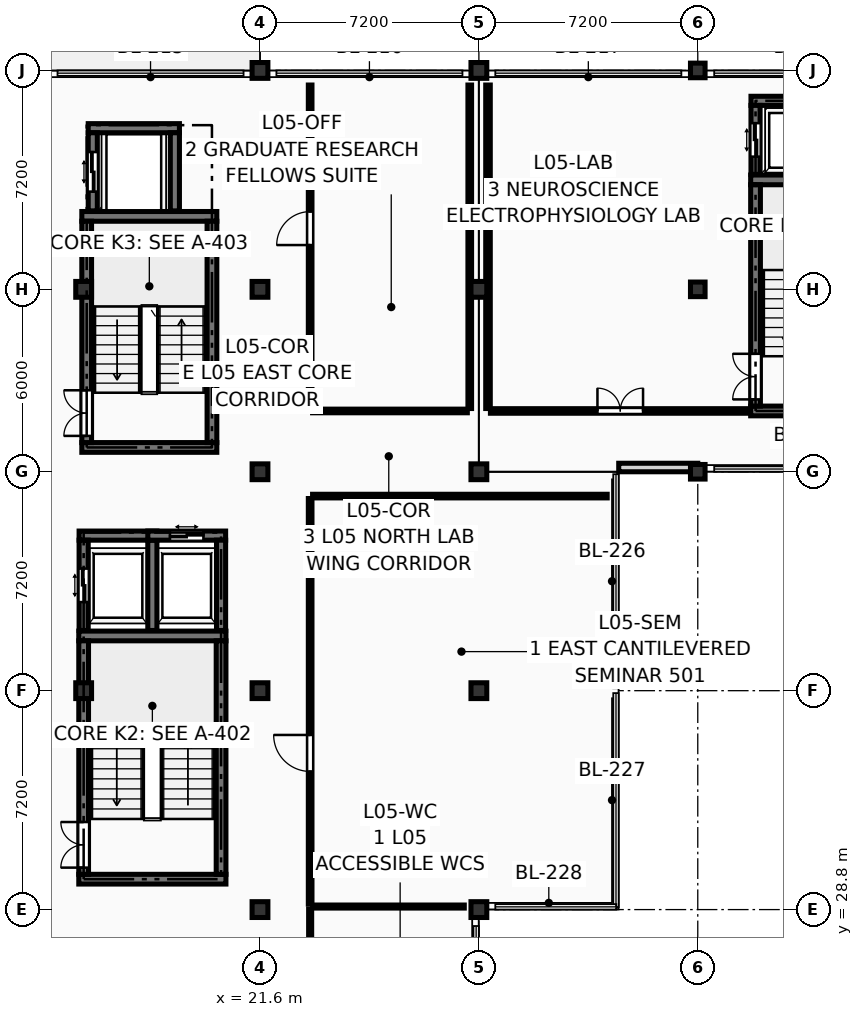
"""IFC4 building model, lengths in metres.
Left out: names, types, materials, properties, quantities, classifications, styles, units other than length and angle.
Written with IfcOpenShell. Run it as: python <this file> out.ifc"""

import sys

from ifc_helpers import new_model, si_unit, direction, frame, frame_2d, origin, origin_2d, place, context, subcontext, project, spatial, rectangle, extrude, element, fill, save


model = new_model("IFC4")
c1 = context("Model", 3, precision=1e-05, world=origin(), true_north=direction((0.0, 1.0)))
c2 = subcontext(c1, "Body", "Model", "MODEL_VIEW")
j1 = project(units=[si_unit("LENGTHUNIT", "METRE"), si_unit("PLANEANGLEUNIT", "RADIAN")], contexts=[c1])
p1 = place(None, origin())
s1 = spatial("IfcSite", under=j1, at=p1, CompositionType="ELEMENT")
p2 = place(p1, origin())
s2 = spatial("IfcBuilding", under=s1, at=p2, CompositionType="ELEMENT")
p3 = place(p2, frame((0.0, 0.0, 19.35)))
s3 = spatial("IfcBuildingStorey", under=s2, at=p3, CompositionType="ELEMENT", Elevation=19.35)
for number, where, z_axis, x_axis in (
    (1, (15.8, 36.0, 0.0), (0.0, 0.0, 1.0), (1.0, 0.0, 0.0)),
    (2, (15.8, 49.2, 0.0), (0.0, 0.0, 1.0), (1.0, 0.0, 0.0)),
    (3, (21.6, 28.8, 0.0), (0.0, 0.0, 1.0), (1.0, 0.0, 0.0)),
    (4, (21.6, 36.0, 0.0), (0.0, 0.0, 1.0), (1.0, 0.0, 0.0)),
    (5, (21.6, 43.2, 0.0), (0.0, 0.0, 1.0), (1.0, 0.0, 0.0)),
    (6, (21.6, 49.2, 0.0), (0.0, 0.0, 1.0), (1.0, 0.0, 0.0)),
    (7, (21.6, 56.4, 0.0), (0.0, 0.0, 1.0), (1.0, 0.0, 0.0)),
    (8, (28.8, 28.8, 0.0), (0.0, 0.0, 1.0), (1.0, 0.0, 0.0)),
    (9, (28.8, 36.0, 0.0), (0.0, 0.0, 1.0), (1.0, 0.0, 0.0)),
    (10, (28.8, 43.2, 0.0), (0.0, 0.0, 1.0), (1.0, 0.0, 0.0)),
    (11, (28.8, 49.2, 0.0), (0.0, 0.0, 1.0), (1.0, 0.0, 0.0)),
    (12, (28.8, 56.4, 0.0), (0.0, 0.0, 1.0), (1.0, 0.0, 0.0)),
):
    element("IfcColumn", number, at=place(p3, frame(where, z_axis=z_axis, x_axis=x_axis)), inside=s3, PredefinedType="COLUMN", context=c2, shape_type="SweptSolid", body=[
        extrude(rectangle(XDim=0.52, YDim=0.52, at=origin_2d()), origin(), (0.0, 0.0, 1.0), 3.6),
    ])
for number, where, z_axis, x_axis in (
    (13, (36.0, 43.2, 0.0), (0.0, 0.0, 1.0), (1.0, 0.0, 0.0)),
    (14, (36.0, 49.2, 0.0), (0.0, 0.0, 1.0), (1.0, 0.0, 0.0)),
    (15, (36.0, 56.4, 0.0), (0.0, 0.0, 1.0), (1.0, 0.0, 0.0)),
):
    element("IfcColumn", number, at=place(p3, frame(where, z_axis=z_axis, x_axis=x_axis)), inside=s3, PredefinedType="COLUMN", context=c2, shape_type="SweptSolid", body=[
        extrude(rectangle(XDim=0.48, YDim=0.48, at=origin_2d()), origin(), (0.0, 0.0, 1.0), 3.6),
    ])
p4 = place(p3, frame((33.4, 43.34, 0.0), z_axis=(0.0, 0.0, 1.0), x_axis=(1.0, 0.0, 0.0)))
e16 = element("IfcWall", 16, at=p4, inside=s3, PredefinedType="SOLIDWALL", context=c2, shape_type="SweptSolid", body=[
    extrude(rectangle(XDim=2.6, YDim=0.28, at=frame_2d((1.3, 0.0))), origin(), (0.0, 0.0, 1.0), 3.38),
])
for number, where, z_axis, x_axis in (
    (17, (15.64, 29.8, 0.0), (0.0, 0.0, 1.0), (1.0, 0.0, 0.0)),
    (18, (15.64, 37.8, 0.0), (0.0, 0.0, 1.0), (1.0, 0.0, 0.0)),
):
    element("IfcWall", number, at=place(p3, frame(where, z_axis=z_axis, x_axis=x_axis)), inside=s3, PredefinedType="SHEAR", context=c2, shape_type="SweptSolid", body=[
        extrude(rectangle(XDim=4.84, YDim=0.32, at=frame_2d((2.42, 0.0))), origin(), (0.0, 0.0, 1.0), 3.39),
    ])
p5 = place(p3, frame((15.8, 29.96, 0.0), z_axis=(0.0, 0.0, 1.0), x_axis=(0.0, 1.0, 0.0)))
e19 = element("IfcWall", 19, at=p5, inside=s3, PredefinedType="SHEAR", context=c2, shape_type="SweptSolid", body=[
    extrude(rectangle(XDim=7.68, YDim=0.32, at=frame_2d((3.84, 0.0))), origin(), (0.0, 0.0, 1.0), 3.39),
])
p6 = place(p5, frame((0.22, 0.0, 0.0)))
e20 = element("IfcOpeningElement", 20, at=p6, cuts=e19, PredefinedType="OPENING", context=c2, shape_type="SweptSolid", body=[
    extrude(rectangle(XDim=1.5, YDim=2.2, at=frame_2d((0.75, 1.1))), frame((0.0, 0.172, 0.0), z_axis=(0.0, -1.0, 0.0), x_axis=(1.0, 0.0, 0.0)), (0.0, 0.0, 1.0), 0.344),
])
p7 = place(p3, frame((20.32, 29.96, 0.0), z_axis=(0.0, 0.0, 1.0), x_axis=(0.0, 1.0, 0.0)))
e21 = element("IfcWall", 21, at=p7, inside=s3, PredefinedType="SHEAR", context=c2, shape_type="SweptSolid", body=[
    extrude(rectangle(XDim=7.68, YDim=0.32, at=frame_2d((3.84, 0.0))), origin(), (0.0, 0.0, 1.0), 3.39),
])
for number, where, z_axis, x_axis in (
    (22, (15.74, 44.0, 0.0), (0.0, 0.0, 1.0), (1.0, 0.0, 0.0)),
    (23, (15.74, 51.6, 0.0), (0.0, 0.0, 1.0), (1.0, 0.0, 0.0)),
):
    element("IfcWall", number, at=place(p3, frame(where, z_axis=z_axis, x_axis=x_axis)), inside=s3, PredefinedType="SHEAR", context=c2, shape_type="SweptSolid", body=[
        extrude(rectangle(XDim=4.44, YDim=0.32, at=frame_2d((2.22, 0.0))), origin(), (0.0, 0.0, 1.0), 3.39),
    ])
p8 = place(p3, frame((15.9, 44.16, 0.0), z_axis=(0.0, 0.0, 1.0), x_axis=(0.0, 1.0, 0.0)))
e24 = element("IfcWall", 24, at=p8, inside=s3, PredefinedType="SHEAR", context=c2, shape_type="SweptSolid", body=[
    extrude(rectangle(XDim=7.28, YDim=0.32, at=frame_2d((3.64, 0.0))), origin(), (0.0, 0.0, 1.0), 3.39),
])
p9 = place(p8, frame((0.22, 0.0, 0.0)))
e25 = element("IfcOpeningElement", 25, at=p9, cuts=e24, PredefinedType="OPENING", context=c2, shape_type="SweptSolid", body=[
    extrude(rectangle(XDim=1.5, YDim=2.2, at=frame_2d((0.75, 1.1))), frame((0.0, 0.172, 0.0), z_axis=(0.0, -1.0, 0.0), x_axis=(1.0, 0.0, 0.0)), (0.0, 0.0, 1.0), 0.344),
])
p10 = place(p3, frame((20.02, 44.16, 0.0), z_axis=(0.0, 0.0, 1.0), x_axis=(0.0, 1.0, 0.0)))
e26 = element("IfcWall", 26, at=p10, inside=s3, PredefinedType="SHEAR", context=c2, shape_type="SweptSolid", body=[
    extrude(rectangle(XDim=7.28, YDim=0.32, at=frame_2d((3.64, 0.0))), origin(), (0.0, 0.0, 1.0), 3.39),
])
for number, where, z_axis, x_axis in (
    (27, (37.74, 45.2, 0.0), (0.0, 0.0, 1.0), (1.0, 0.0, 0.0)),
    (28, (37.74, 52.8, 0.0), (0.0, 0.0, 1.0), (1.0, 0.0, 0.0)),
):
    element("IfcWall", number, at=place(p3, frame(where, z_axis=z_axis, x_axis=x_axis)), inside=s3, PredefinedType="SHEAR", context=c2, shape_type="SweptSolid", body=[
        extrude(rectangle(XDim=4.44, YDim=0.32, at=frame_2d((2.22, 0.0))), origin(), (0.0, 0.0, 1.0), 3.39),
    ])
p11 = place(p3, frame((37.9, 45.36, 0.0), z_axis=(0.0, 0.0, 1.0), x_axis=(0.0, 1.0, 0.0)))
e29 = element("IfcWall", 29, at=p11, inside=s3, PredefinedType="SHEAR", context=c2, shape_type="SweptSolid", body=[
    extrude(rectangle(XDim=7.28, YDim=0.32, at=frame_2d((3.64, 0.0))), origin(), (0.0, 0.0, 1.0), 3.39),
])
p12 = place(p11, frame((0.22, 0.0, 0.0)))
e30 = element("IfcOpeningElement", 30, at=p12, cuts=e29, PredefinedType="OPENING", context=c2, shape_type="SweptSolid", body=[
    extrude(rectangle(XDim=1.5, YDim=2.2, at=frame_2d((0.75, 1.1))), frame((0.0, 0.172, 0.0), z_axis=(0.0, -1.0, 0.0), x_axis=(1.0, 0.0, 0.0)), (0.0, 0.0, 1.0), 0.344),
])
p13 = place(p3, frame((15.65, 41.1, 0.0), z_axis=(0.0, 0.0, 1.0), x_axis=(1.0, 0.0, 0.0)))
e31 = element("IfcWall", 31, at=p13, inside=s3, PredefinedType="SHEAR", context=c2, shape_type="SweptSolid", body=[
    extrude(rectangle(XDim=2.56, YDim=0.3, at=frame_2d((1.28, 0.0))), origin(), (0.0, 0.0, 1.0), 3.39),
])
p14 = place(p3, frame((15.8, 37.98, 0.0), z_axis=(0.0, 0.0, 1.0), x_axis=(0.0, 1.0, 0.0)))
e32 = element("IfcWall", 32, at=p14, inside=s3, PredefinedType="SHEAR", context=c2, shape_type="SweptSolid", body=[
    extrude(rectangle(XDim=2.97, YDim=0.3, at=frame_2d((1.485, 0.0))), origin(), (0.0, 0.0, 1.0), 3.39),
])
p15 = place(p14, frame((0.935, 0.0, 0.0)))
e33 = element("IfcOpeningElement", 33, at=p15, cuts=e32, PredefinedType="OPENING", context=c2, shape_type="SweptSolid", body=[
    extrude(rectangle(XDim=1.1, YDim=2.2, at=frame_2d((0.55, 1.1))), frame((0.0, 0.162, 0.0), z_axis=(0.0, -1.0, 0.0), x_axis=(1.0, 0.0, 0.0)), (0.0, 0.0, 1.0), 0.324),
])
p16 = place(p3, frame((18.06, 37.98, 0.0), z_axis=(0.0, 0.0, 1.0), x_axis=(0.0, 1.0, 0.0)))
e34 = element("IfcWall", 34, at=p16, inside=s3, PredefinedType="SHEAR", context=c2, shape_type="SweptSolid", body=[
    extrude(rectangle(XDim=2.97, YDim=0.3, at=frame_2d((1.485, 0.0))), origin(), (0.0, 0.0, 1.0), 3.39),
])
p17 = place(p3, frame((17.91, 41.1, 0.0), z_axis=(0.0, 0.0, 1.0), x_axis=(1.0, 0.0, 0.0)))
e35 = element("IfcWall", 35, at=p17, inside=s3, PredefinedType="SHEAR", context=c2, shape_type="SweptSolid", body=[
    extrude(rectangle(XDim=2.56, YDim=0.3, at=frame_2d((1.28, 0.0))), origin(), (0.0, 0.0, 1.0), 3.39),
])
p18 = place(p17, frame((0.73, 0.0, 0.0)))
e36 = element("IfcOpeningElement", 36, at=p18, cuts=e35, PredefinedType="OPENING", context=c2, shape_type="SweptSolid", body=[
    extrude(rectangle(XDim=1.1, YDim=2.2, at=frame_2d((0.55, 1.1))), frame((0.0, 0.162, 0.0), z_axis=(0.0, -1.0, 0.0), x_axis=(1.0, 0.0, 0.0)), (0.0, 0.0, 1.0), 0.324),
])
p19 = place(p3, frame((20.32, 37.98, 0.0), z_axis=(0.0, 0.0, 1.0), x_axis=(0.0, 1.0, 0.0)))
e37 = element("IfcWall", 37, at=p19, inside=s3, PredefinedType="SHEAR", context=c2, shape_type="SweptSolid", body=[
    extrude(rectangle(XDim=2.97, YDim=0.3, at=frame_2d((1.485, 0.0))), origin(), (0.0, 0.0, 1.0), 3.39),
])
p20 = place(p3, frame((37.75, 55.4, 0.0), z_axis=(0.0, 0.0, 1.0), x_axis=(1.0, 0.0, 0.0)))
e38 = element("IfcWall", 38, at=p20, inside=s3, PredefinedType="SHEAR", context=c2, shape_type="SweptSolid", body=[
    extrude(rectangle(XDim=2.7, YDim=0.3, at=frame_2d((1.35, 0.0))), origin(), (0.0, 0.0, 1.0), 3.39),
])
p21 = place(p3, frame((37.9, 52.98, 0.0), z_axis=(0.0, 0.0, 1.0), x_axis=(0.0, 1.0, 0.0)))
e39 = element("IfcWall", 39, at=p21, inside=s3, PredefinedType="SHEAR", context=c2, shape_type="SweptSolid", body=[
    extrude(rectangle(XDim=2.27, YDim=0.3, at=frame_2d((1.135, 0.0))), origin(), (0.0, 0.0, 1.0), 3.39),
])
p22 = place(p21, frame((0.585, 0.0, 0.0)))
e40 = element("IfcOpeningElement", 40, at=p22, cuts=e39, PredefinedType="OPENING", context=c2, shape_type="SweptSolid", body=[
    extrude(rectangle(XDim=1.1, YDim=2.2, at=frame_2d((0.55, 1.1))), frame((0.0, 0.162, 0.0), z_axis=(0.0, -1.0, 0.0), x_axis=(1.0, 0.0, 0.0)), (0.0, 0.0, 1.0), 0.324),
])
p23 = place(p3, frame((15.95, 54.5, 0.0), z_axis=(0.0, 0.0, 1.0), x_axis=(1.0, 0.0, 0.0)))
e41 = element("IfcWall", 41, at=p23, inside=s3, PredefinedType="SHEAR", context=c2, shape_type="SweptSolid", body=[
    extrude(rectangle(XDim=3.0, YDim=0.3, at=frame_2d((1.5, 0.0))), origin(), (0.0, 0.0, 1.0), 3.39),
])
p24 = place(p3, frame((16.1, 51.78, 0.0), z_axis=(0.0, 0.0, 1.0), x_axis=(0.0, 1.0, 0.0)))
e42 = element("IfcWall", 42, at=p24, inside=s3, PredefinedType="SHEAR", context=c2, shape_type="SweptSolid", body=[
    extrude(rectangle(XDim=2.57, YDim=0.3, at=frame_2d((1.285, 0.0))), origin(), (0.0, 0.0, 1.0), 3.39),
])
p25 = place(p24, frame((0.635, 0.0, 0.0)))
e43 = element("IfcOpeningElement", 43, at=p25, cuts=e42, PredefinedType="OPENING", context=c2, shape_type="SweptSolid", body=[
    extrude(rectangle(XDim=1.3, YDim=2.25, at=frame_2d((0.65, 1.125))), frame((0.0, 0.162, 0.0), z_axis=(0.0, -1.0, 0.0), x_axis=(1.0, 0.0, 0.0)), (0.0, 0.0, 1.0), 0.324),
])
p26 = place(p3, frame((18.8, 51.78, 0.0), z_axis=(0.0, 0.0, 1.0), x_axis=(0.0, 1.0, 0.0)))
e44 = element("IfcWall", 44, at=p26, inside=s3, PredefinedType="SHEAR", context=c2, shape_type="SweptSolid", body=[
    extrude(rectangle(XDim=2.57, YDim=0.3, at=frame_2d((1.285, 0.0))), origin(), (0.0, 0.0, 1.0), 3.39),
])
p27 = place(p3, frame((23.25, 24.08, 0.0), z_axis=(0.0, 0.0, 1.0), x_axis=(0.0, 1.0, 0.0)))
e45 = element("IfcWall", 45, at=p27, inside=s3, PredefinedType="PARTITIONING", context=c2, shape_type="SweptSolid", body=[
    extrude(rectangle(XDim=4.74, YDim=0.1, at=frame_2d((2.37, 0.0))), origin(), (0.0, 0.0, 1.0), 3.375),
])
p28 = place(p27, frame((1.895, 0.0, 0.0)))
e46 = element("IfcOpeningElement", 46, at=p28, cuts=e45, PredefinedType="OPENING", context=c2, shape_type="SweptSolid", body=[
    extrude(rectangle(XDim=0.95, YDim=2.1, at=frame_2d((0.475, 1.05))), frame((0.0, 0.062, 0.0), z_axis=(0.0, -1.0, 0.0), x_axis=(1.0, 0.0, 0.0)), (0.0, 0.0, 1.0), 0.124),
])
p29 = place(p3, frame((23.33, 28.9, 0.0), z_axis=(0.0, 0.0, 1.0), x_axis=(1.0, 0.0, 0.0)))
e47 = element("IfcWall", 47, at=p29, inside=s3, PredefinedType="PARTITIONING", context=c2, shape_type="SweptSolid", body=[
    extrude(rectangle(XDim=4.99, YDim=0.1, at=frame_2d((2.495, 0.0))), origin(), (0.0, 0.0, 1.0), 2.691),
])
p30 = place(p3, frame((23.25, 28.98, 0.0), z_axis=(0.0, 0.0, 1.0), x_axis=(0.0, 1.0, 0.0)))
e48 = element("IfcWall", 48, at=p30, inside=s3, PredefinedType="PARTITIONING", context=c2, shape_type="SweptSolid", body=[
    extrude(rectangle(XDim=13.34, YDim=0.12, at=frame_2d((6.67, 0.0))), origin(), (0.0, 0.0, 1.0), 3.375),
])
p31 = place(p30, frame((4.364, 0.0, 0.0)))
e49 = element("IfcOpeningElement", 49, at=p31, cuts=e48, PredefinedType="OPENING", context=c2, shape_type="SweptSolid", body=[
    extrude(rectangle(XDim=1.2, YDim=2.15, at=frame_2d((0.6, 1.075))), frame((0.0, 0.072, 0.0), z_axis=(0.0, -1.0, 0.0), x_axis=(1.0, 0.0, 0.0)), (0.0, 0.0, 1.0), 0.144),
])
p32 = place(p3, frame((23.33, 42.4, 0.0), z_axis=(0.0, 0.0, 1.0), x_axis=(1.0, 0.0, 0.0)))
e50 = element("IfcWall", 50, at=p32, inside=s3, PredefinedType="PARTITIONING", context=c2, shape_type="SweptSolid", body=[
    extrude(rectangle(XDim=9.69, YDim=0.12, at=frame_2d((4.845, 0.0))), origin(), (0.0, 0.0, 1.0), 3.375),
])
p33 = place(p3, frame((29.1, 45.28, 0.0), z_axis=(0.0, 0.0, 1.0), x_axis=(0.0, 1.0, 0.0)))
e51 = element("IfcWall", 51, at=p33, inside=s3, PredefinedType="PARTITIONING", context=c2, shape_type="SweptSolid", body=[
    extrude(rectangle(XDim=10.64, YDim=0.15, at=frame_2d((5.32, 0.0))), origin(), (0.0, 0.0, 1.0), 2.715),
])
p34 = place(p3, frame((29.18, 45.2, 0.0), z_axis=(0.0, 0.0, 1.0), x_axis=(1.0, 0.0, 0.0)))
e52 = element("IfcWall", 52, at=p34, inside=s3, PredefinedType="PARTITIONING", context=c2, shape_type="SweptSolid", body=[
    extrude(rectangle(XDim=8.54, YDim=0.15, at=frame_2d((4.27, 0.0))), origin(), (0.0, 0.0, 1.0), 3.375),
])
p35 = place(p34, frame((3.52, 0.0, 0.0)))
e53 = element("IfcOpeningElement", 53, at=p35, cuts=e52, PredefinedType="OPENING", context=c2, shape_type="SweptSolid", body=[
    extrude(rectangle(XDim=1.5, YDim=2.2, at=frame_2d((0.75, 1.1))), frame((0.0, 0.087, 0.0), z_axis=(0.0, -1.0, 0.0), x_axis=(1.0, 0.0, 0.0)), (0.0, 0.0, 1.0), 0.174),
])
p36 = place(p3, frame((23.25, 45.28, 0.0), z_axis=(0.0, 0.0, 1.0), x_axis=(0.0, 1.0, 0.0)))
e54 = element("IfcWall", 54, at=p36, inside=s3, PredefinedType="PARTITIONING", context=c2, shape_type="SweptSolid", body=[
    extrude(rectangle(XDim=10.64, YDim=0.12, at=frame_2d((5.32, 0.0))), origin(), (0.0, 0.0, 1.0), 3.375),
])
p37 = place(p36, frame((5.377, 0.0, 0.0)))
e55 = element("IfcOpeningElement", 55, at=p37, cuts=e54, PredefinedType="OPENING", context=c2, shape_type="SweptSolid", body=[
    extrude(rectangle(XDim=1.1, YDim=2.15, at=frame_2d((0.55, 1.075))), frame((0.0, 0.072, 0.0), z_axis=(0.0, -1.0, 0.0), x_axis=(1.0, 0.0, 0.0)), (0.0, 0.0, 1.0), 0.144),
])
p38 = place(p3, frame((23.33, 45.2, 0.0), z_axis=(0.0, 0.0, 1.0), x_axis=(1.0, 0.0, 0.0)))
e56 = element("IfcWall", 56, at=p38, inside=s3, PredefinedType="PARTITIONING", context=c2, shape_type="SweptSolid", body=[
    extrude(rectangle(XDim=5.09, YDim=0.12, at=frame_2d((2.545, 0.0))), origin(), (0.0, 0.0, 1.0), 3.375),
])
p39 = place(p3, frame((28.5, 45.28, 0.0), z_axis=(0.0, 0.0, 1.0), x_axis=(0.0, 1.0, 0.0)))
e57 = element("IfcWall", 57, at=p39, inside=s3, PredefinedType="PARTITIONING", context=c2, shape_type="SweptSolid", body=[
    extrude(rectangle(XDim=10.64, YDim=0.12, at=frame_2d((5.32, 0.0))), origin(), (0.0, 0.0, 1.0), 2.715),
])
p40 = place(p6, origin())
e58 = element("IfcDoor", 58, at=p40, inside=s3, OperationType="DOUBLE_DOOR_SINGLE_SWING", PredefinedType="DOOR", context=c2, shape_type="SweptSolid", body=[
    extrude(rectangle(XDim=1.5, YDim=2.2, at=frame_2d((0.75, 1.1))), frame((0.0, 0.025, 0.0), z_axis=(0.0, -1.0, 0.0), x_axis=(1.0, 0.0, 0.0)), (0.0, 0.0, 1.0), 0.05),
])
fill(e20, e58)
p41 = place(p9, origin())
e59 = element("IfcDoor", 59, at=p41, inside=s3, OperationType="DOUBLE_DOOR_SINGLE_SWING", PredefinedType="DOOR", context=c2, shape_type="SweptSolid", body=[
    extrude(rectangle(XDim=1.5, YDim=2.2, at=frame_2d((0.75, 1.1))), frame((0.0, 0.025, 0.0), z_axis=(0.0, -1.0, 0.0), x_axis=(1.0, 0.0, 0.0)), (0.0, 0.0, 1.0), 0.05),
])
fill(e25, e59)
p42 = place(p12, origin())
e60 = element("IfcDoor", 60, at=p42, inside=s3, OperationType="DOUBLE_DOOR_SINGLE_SWING", PredefinedType="DOOR", context=c2, shape_type="SweptSolid", body=[
    extrude(rectangle(XDim=1.5, YDim=2.2, at=frame_2d((0.75, 1.1))), frame((0.0, 0.025, 0.0), z_axis=(0.0, -1.0, 0.0), x_axis=(1.0, 0.0, 0.0)), (0.0, 0.0, 1.0), 0.05),
])
fill(e30, e60)
p43 = place(p15, origin())
e61 = element("IfcDoor", 61, at=p43, inside=s3, OperationType="DOUBLE_DOOR_SLIDING", PredefinedType="DOOR", context=c2, shape_type="SweptSolid", body=[
    extrude(rectangle(XDim=1.1, YDim=2.2, at=frame_2d((0.55, 1.1))), frame((0.0, 0.025, 0.0), z_axis=(0.0, -1.0, 0.0), x_axis=(1.0, 0.0, 0.0)), (0.0, 0.0, 1.0), 0.05),
])
fill(e33, e61)
p44 = place(p18, origin())
e62 = element("IfcDoor", 62, at=p44, inside=s3, OperationType="DOUBLE_DOOR_SLIDING", PredefinedType="DOOR", context=c2, shape_type="SweptSolid", body=[
    extrude(rectangle(XDim=1.1, YDim=2.2, at=frame_2d((0.55, 1.1))), frame((0.0, 0.025, 0.0), z_axis=(0.0, -1.0, 0.0), x_axis=(1.0, 0.0, 0.0)), (0.0, 0.0, 1.0), 0.05),
])
fill(e36, e62)
p45 = place(p22, origin())
e63 = element("IfcDoor", 63, at=p45, inside=s3, OperationType="DOUBLE_DOOR_SLIDING", PredefinedType="DOOR", context=c2, shape_type="SweptSolid", body=[
    extrude(rectangle(XDim=1.1, YDim=2.2, at=frame_2d((0.55, 1.1))), frame((0.0, 0.025, 0.0), z_axis=(0.0, -1.0, 0.0), x_axis=(1.0, 0.0, 0.0)), (0.0, 0.0, 1.0), 0.05),
])
fill(e40, e63)
p46 = place(p25, origin())
e64 = element("IfcDoor", 64, at=p46, inside=s3, OperationType="DOUBLE_DOOR_SLIDING", PredefinedType="DOOR", context=c2, shape_type="SweptSolid", body=[
    extrude(rectangle(XDim=1.3, YDim=2.25, at=frame_2d((0.65, 1.125))), frame((0.0, 0.025, 0.0), z_axis=(0.0, -1.0, 0.0), x_axis=(1.0, 0.0, 0.0)), (0.0, 0.0, 1.0), 0.05),
])
fill(e43, e64)
p47 = place(p31, origin())
e65 = element("IfcDoor", 65, at=p47, inside=s3, OperationType="SINGLE_SWING_RIGHT", PredefinedType="DOOR", context=c2, shape_type="SweptSolid", body=[
    extrude(rectangle(XDim=1.2, YDim=2.15, at=frame_2d((0.6, 1.075))), frame((0.0, 0.025, 0.0), z_axis=(0.0, -1.0, 0.0), x_axis=(1.0, 0.0, 0.0)), (0.0, 0.0, 1.0), 0.05),
])
fill(e49, e65)
p48 = place(p35, origin())
e66 = element("IfcDoor", 66, at=p48, inside=s3, OperationType="DOUBLE_DOOR_SINGLE_SWING", PredefinedType="DOOR", context=c2, shape_type="SweptSolid", body=[
    extrude(rectangle(XDim=1.5, YDim=2.2, at=frame_2d((0.75, 1.1))), frame((0.0, 0.025, 0.0), z_axis=(0.0, -1.0, 0.0), x_axis=(1.0, 0.0, 0.0)), (0.0, 0.0, 1.0), 0.05),
])
fill(e53, e66)
p49 = place(p37, origin())
e67 = element("IfcDoor", 67, at=p49, inside=s3, OperationType="SINGLE_SWING_LEFT", PredefinedType="DOOR", context=c2, shape_type="SweptSolid", body=[
    extrude(rectangle(XDim=1.1, YDim=2.15, at=frame_2d((0.55, 1.075))), frame((0.0, 0.025, 0.0), z_axis=(0.0, -1.0, 0.0), x_axis=(1.0, 0.0, 0.0)), (0.0, 0.0, 1.0), 0.05),
])
fill(e55, e67)
save(model, sys.argv[1])
